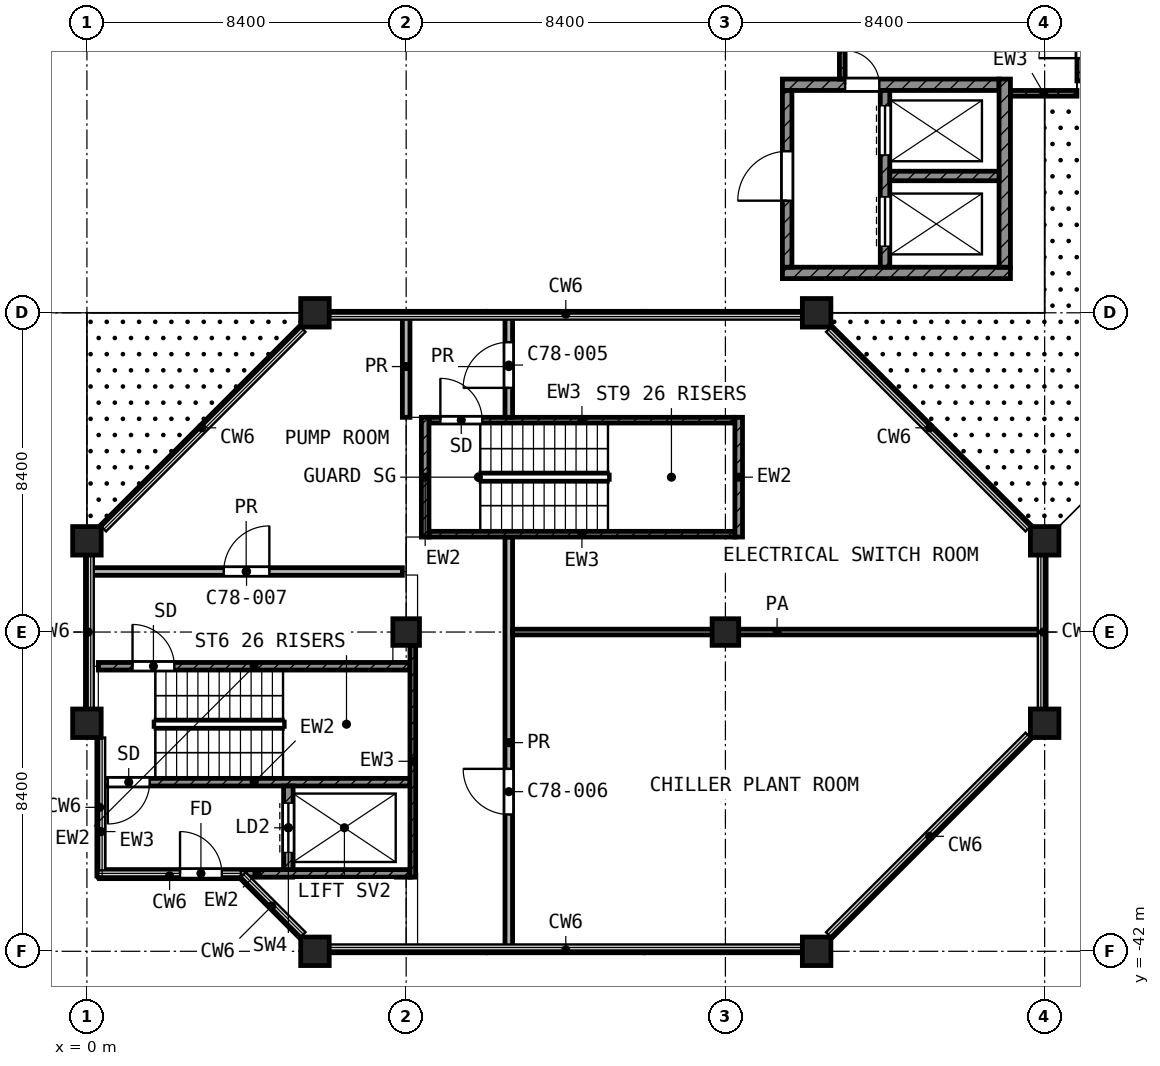
"""IFC4 building model, lengths in metres.
Left out: names, types, materials, properties, quantities, classifications, styles, units other than length and angle.
Written with IfcOpenShell. Run it as: python <this file> out.ifc"""

import sys

from ifc_helpers import new_model, si_unit, direction, frame, frame_2d, origin, origin_2d, place, context, subcontext, project, spatial, rectangle, extrude, element, fill, save


model = new_model("IFC4")
c1 = context("Model", 3, precision=1e-05, world=origin(), true_north=direction((0.0, 1.0)))
c2 = subcontext(c1, "Body", "Model", "MODEL_VIEW")
j1 = project(units=[si_unit("LENGTHUNIT", "METRE"), si_unit("PLANEANGLEUNIT", "RADIAN")], contexts=[c1])
p1 = place(None, origin())
s1 = spatial("IfcSite", under=j1, at=p1, CompositionType="ELEMENT")
p2 = place(p1, origin())
s2 = spatial("IfcBuilding", under=s1, at=p2, CompositionType="ELEMENT")
p3 = place(p2, frame((0.0, 0.0, 336.7)))
s3 = spatial("IfcBuildingStorey", under=s2, at=p3, CompositionType="ELEMENT", Elevation=336.7)
for number, where, z_axis, x_axis in (
    (1, (6.0, -25.2, 0.0), (0.0, 0.0, 1.0), (1.0, 0.0, 0.0)),
    (2, (19.2, -25.2, 0.0), (0.0, 0.0, 1.0), (1.0, 0.0, 0.0)),
    (3, (0.0, -31.2, 0.0), (0.0, 0.0, 1.0), (1.0, 0.0, 0.0)),
    (4, (25.2, -31.2, 0.0), (0.0, 0.0, 1.0), (1.0, 0.0, 0.0)),
):
    element("IfcColumn", number, at=place(p3, frame(where, z_axis=z_axis, x_axis=x_axis)), inside=s3, PredefinedType="COLUMN", context=c2, shape_type="SweptSolid", body=[
        extrude(rectangle(XDim=0.75, YDim=0.75, at=origin_2d()), origin(), (0.0, 0.0, 1.0), 4.5),
    ])
for number, where, z_axis, x_axis in (
    (5, (8.4, -33.6, 0.0), (0.0, 0.0, 1.0), (1.0, 0.0, 0.0)),
    (6, (16.8, -33.6, 0.0), (0.0, 0.0, 1.0), (1.0, 0.0, 0.0)),
):
    element("IfcColumn", number, at=place(p3, frame(where, z_axis=z_axis, x_axis=x_axis)), inside=s3, PredefinedType="COLUMN", context=c2, shape_type="SweptSolid", body=[
        extrude(rectangle(XDim=0.7, YDim=0.7, at=origin_2d()), origin(), (0.0, 0.0, 1.0), 4.5),
    ])
for number, where, z_axis, x_axis in (
    (7, (0.0, -36.0, 0.0), (0.0, 0.0, 1.0), (1.0, 0.0, 0.0)),
    (8, (25.2, -36.0, 0.0), (0.0, 0.0, 1.0), (1.0, 0.0, 0.0)),
    (9, (6.0, -42.0, 0.0), (0.0, 0.0, 1.0), (1.0, 0.0, 0.0)),
    (10, (19.2, -42.0, 0.0), (0.0, 0.0, 1.0), (1.0, 0.0, 0.0)),
):
    element("IfcColumn", number, at=place(p3, frame(where, z_axis=z_axis, x_axis=x_axis)), inside=s3, PredefinedType="COLUMN", context=c2, shape_type="SweptSolid", body=[
        extrude(rectangle(XDim=0.75, YDim=0.75, at=origin_2d()), origin(), (0.0, 0.0, 1.0), 4.5),
    ])
p4 = place(p3, frame((0.375, -40.05, 0.0), z_axis=(0.0, 0.0, 1.0), x_axis=(0.0, 1.0, 0.0)))
e11 = element("IfcWall", 11, at=p4, inside=s3, PredefinedType="SHEAR", context=c2, shape_type="SweptSolid", body=[
    extrude(rectangle(XDim=2.4, YDim=0.15, at=frame_2d((1.2, 0.0))), origin(), (0.0, 0.0, 1.0), 4.2),
])
p5 = place(p3, frame((8.575, -40.05, 0.0), z_axis=(0.0, 0.0, 1.0), x_axis=(0.0, 1.0, 0.0)))
e12 = element("IfcWall", 12, at=p5, inside=s3, PredefinedType="SHEAR", context=c2, shape_type="SweptSolid", body=[
    extrude(rectangle(XDim=6.1, YDim=0.15, at=frame_2d((3.05, 0.0))), origin(), (0.0, 0.0, 1.0), 4.2),
])
p6 = place(p3, frame((0.3, -34.5, 0.0), z_axis=(0.0, 0.0, 1.0), x_axis=(1.0, 0.0, 0.0)))
e13 = element("IfcWall", 13, at=p6, inside=s3, PredefinedType="SHEAR", context=c2, shape_type="SweptSolid", body=[
    extrude(rectangle(XDim=8.2, YDim=0.2, at=frame_2d((4.1, 0.0))), origin(), (0.0, 0.0, 1.0), 4.2),
])
p7 = place(p6, frame((0.9, 0.0, 0.0)))
e14 = element("IfcOpeningElement", 14, at=p7, cuts=e13, PredefinedType="OPENING", context=c2, shape_type="SweptSolid", body=[
    extrude(rectangle(XDim=1.1, YDim=2.1, at=frame_2d((0.55, 1.05))), frame((0.0, 0.11, 0.0), z_axis=(0.0, -1.0, 0.0), x_axis=(1.0, 0.0, 0.0)), (0.0, 0.0, 1.0), 0.22),
])
p8 = place(p3, frame((0.3, -37.55, 0.0), z_axis=(0.0, 0.0, 1.0), x_axis=(1.0, 0.0, 0.0)))
e15 = element("IfcWall", 15, at=p8, inside=s3, PredefinedType="SHEAR", context=c2, shape_type="SweptSolid", body=[
    extrude(rectangle(XDim=8.2, YDim=0.2, at=frame_2d((4.1, 0.0))), origin(), (0.0, 0.0, 1.0), 4.2),
])
p9 = place(p8, frame((0.25, 0.0, 0.0)))
e16 = element("IfcOpeningElement", 16, at=p9, cuts=e15, PredefinedType="OPENING", context=c2, shape_type="SweptSolid", body=[
    extrude(rectangle(XDim=1.1, YDim=2.1, at=frame_2d((0.55, 1.05))), frame((0.0, 0.11, 0.0), z_axis=(0.0, -1.0, 0.0), x_axis=(1.0, 0.0, 0.0)), (0.0, 0.0, 1.0), 0.22),
])
p10 = place(p3, frame((0.45, -39.95, 0.0), z_axis=(0.0, 0.0, 1.0), x_axis=(1.0, 0.0, 0.0)))
e17 = element("IfcWall", 17, at=p10, inside=s3, PredefinedType="SHEAR", context=c2, shape_type="SweptSolid", body=[
    extrude(rectangle(XDim=8.05, YDim=0.2, at=frame_2d((4.025, 0.0))), origin(), (0.0, 0.0, 1.0), 4.2),
])
p11 = place(p10, frame((2.0, 0.0, 0.0)))
e18 = element("IfcOpeningElement", 18, at=p11, cuts=e17, PredefinedType="OPENING", context=c2, shape_type="SweptSolid", body=[
    extrude(rectangle(XDim=1.1, YDim=2.1, at=frame_2d((0.55, 1.05))), frame((0.0, 0.11, 0.0), z_axis=(0.0, -1.0, 0.0), x_axis=(1.0, 0.0, 0.0)), (0.0, 0.0, 1.0), 0.22),
])
p12 = place(p3, frame((5.3, -39.85, 0.0), z_axis=(0.0, 0.0, 1.0), x_axis=(0.0, 1.0, 0.0)))
e19 = element("IfcWall", 19, at=p12, inside=s3, PredefinedType="SHEAR", context=c2, shape_type="SweptSolid", body=[
    extrude(rectangle(XDim=2.2, YDim=0.25, at=frame_2d((1.1, 0.0))), origin(), (0.0, 0.0, 1.0), 4.2),
])
p13 = place(p12, frame((0.45, 0.0, 0.0)))
e20 = element("IfcOpeningElement", 20, at=p13, cuts=e19, PredefinedType="OPENING", context=c2, shape_type="SweptSolid", body=[
    extrude(rectangle(XDim=1.3, YDim=2.1, at=frame_2d((0.65, 1.05))), frame((0.0, 0.135, 0.0), z_axis=(0.0, -1.0, 0.0), x_axis=(1.0, 0.0, 0.0)), (0.0, 0.0, 1.0), 0.27),
])
p14 = place(p3, frame((26.15, -19.1, 0.0), z_axis=(0.0, 0.0, 1.0), x_axis=(0.0, 1.0, 0.0)))
e21 = element("IfcWall", 21, at=p14, inside=s3, PredefinedType="SHEAR", context=c2, shape_type="SweptSolid", body=[
    extrude(rectangle(XDim=3.15, YDim=0.2, at=frame_2d((1.575, 0.0))), origin(), (0.0, 0.0, 1.0), 4.2),
])
p15 = place(p14, frame((0.6, 0.0, 0.0)))
e22 = element("IfcOpeningElement", 22, at=p15, cuts=e21, PredefinedType="OPENING", context=c2, shape_type="SweptSolid", body=[
    extrude(rectangle(XDim=1.1, YDim=2.1, at=frame_2d((0.55, 1.05))), frame((0.0, 0.11, 0.0), z_axis=(0.0, -1.0, 0.0), x_axis=(1.0, 0.0, 0.0)), (0.0, 0.0, 1.0), 0.22),
])
for number, where, z_axis, x_axis in (
    (23, (8.9, -31.1, 0.0), (0.0, 0.0, 1.0), (0.0, 1.0, 0.0)),
    (24, (17.15, -31.1, 0.0), (0.0, 0.0, 1.0), (0.0, 1.0, 0.0)),
):
    element("IfcWall", number, at=place(p3, frame(where, z_axis=z_axis, x_axis=x_axis)), inside=s3, PredefinedType="SHEAR", context=c2, shape_type="SweptSolid", body=[
        extrude(rectangle(XDim=3.15, YDim=0.2, at=frame_2d((1.575, 0.0))), origin(), (0.0, 0.0, 1.0), 4.2),
    ])
p16 = place(p3, frame((9.0, -28.025, 0.0), z_axis=(0.0, 0.0, 1.0), x_axis=(1.0, 0.0, 0.0)))
e25 = element("IfcWall", 25, at=p16, inside=s3, PredefinedType="SHEAR", context=c2, shape_type="SweptSolid", body=[
    extrude(rectangle(XDim=8.05, YDim=0.15, at=frame_2d((4.025, 0.0))), origin(), (0.0, 0.0, 1.0), 4.2),
])
p17 = place(p16, frame((0.3, 0.0, 0.0)))
e26 = element("IfcOpeningElement", 26, at=p17, cuts=e25, PredefinedType="OPENING", context=c2, shape_type="SweptSolid", body=[
    extrude(rectangle(XDim=1.1, YDim=2.1, at=frame_2d((0.55, 1.05))), frame((0.0, 0.085, 0.0), z_axis=(0.0, -1.0, 0.0), x_axis=(1.0, 0.0, 0.0)), (0.0, 0.0, 1.0), 0.17),
])
p18 = place(p3, frame((9.0, -31.025, 0.0), z_axis=(0.0, 0.0, 1.0), x_axis=(1.0, 0.0, 0.0)))
e27 = element("IfcWall", 27, at=p18, inside=s3, PredefinedType="SHEAR", context=c2, shape_type="SweptSolid", body=[
    extrude(rectangle(XDim=8.05, YDim=0.15, at=frame_2d((4.025, 0.0))), origin(), (0.0, 0.0, 1.0), 4.2),
])
p19 = place(p3, frame((18.3, -24.15, 0.0), z_axis=(0.0, 0.0, 1.0), x_axis=(1.0, 0.0, 0.0)))
e28 = element("IfcWall", 28, at=p19, inside=s3, PredefinedType="SHEAR", context=c2, shape_type="SweptSolid", body=[
    extrude(rectangle(XDim=6.0, YDim=0.3, at=frame_2d((3.0, 0.0))), origin(), (0.0, 0.0, 1.0), 4.2),
])
p20 = place(p3, frame((24.15, -24.0, 0.0), z_axis=(0.0, 0.0, 1.0), x_axis=(0.0, 1.0, 0.0)))
e29 = element("IfcWall", 29, at=p20, inside=s3, PredefinedType="SHEAR", context=c2, shape_type="SweptSolid", body=[
    extrude(rectangle(XDim=4.95, YDim=0.3, at=frame_2d((2.475, 0.0))), origin(), (0.0, 0.0, 1.0), 4.2),
])
p21 = place(p3, frame((18.3, -19.2, 0.0), z_axis=(0.0, 0.0, 1.0), x_axis=(1.0, 0.0, 0.0)))
e30 = element("IfcWall", 30, at=p21, inside=s3, PredefinedType="SHEAR", context=c2, shape_type="SweptSolid", body=[
    extrude(rectangle(XDim=5.7, YDim=0.3, at=frame_2d((2.85, 0.0))), origin(), (0.0, 0.0, 1.0), 4.2),
])
p22 = place(p21, frame((1.65, 0.0, 0.0)))
e31 = element("IfcOpeningElement", 31, at=p22, cuts=e30, PredefinedType="OPENING", context=c2, shape_type="SweptSolid", body=[
    extrude(rectangle(XDim=0.9, YDim=2.1, at=frame_2d((0.45, 1.05))), frame((0.0, 0.16, 0.0), z_axis=(0.0, -1.0, 0.0), x_axis=(1.0, 0.0, 0.0)), (0.0, 0.0, 1.0), 0.32),
])
p23 = place(p3, frame((18.425, -24.0, 0.0), z_axis=(0.0, 0.0, 1.0), x_axis=(0.0, 1.0, 0.0)))
e32 = element("IfcWall", 32, at=p23, inside=s3, PredefinedType="SHEAR", context=c2, shape_type="SweptSolid", body=[
    extrude(rectangle(XDim=4.65, YDim=0.25, at=frame_2d((2.325, 0.0))), origin(), (0.0, 0.0, 1.0), 4.2),
])
p24 = place(p23, frame((1.75, 0.0, 0.0)))
e33 = element("IfcOpeningElement", 33, at=p24, cuts=e32, PredefinedType="OPENING", context=c2, shape_type="SweptSolid", body=[
    extrude(rectangle(XDim=1.3, YDim=2.1, at=frame_2d((0.65, 1.05))), frame((0.0, 0.135, 0.0), z_axis=(0.0, -1.0, 0.0), x_axis=(1.0, 0.0, 0.0)), (0.0, 0.0, 1.0), 0.27),
])
p25 = place(p3, frame((21.0, -24.0, 0.0), z_axis=(0.0, 0.0, 1.0), x_axis=(0.0, 1.0, 0.0)))
e34 = element("IfcWall", 34, at=p25, inside=s3, PredefinedType="SHEAR", context=c2, shape_type="SweptSolid", body=[
    extrude(rectangle(XDim=4.65, YDim=0.25, at=frame_2d((2.325, 0.0))), origin(), (0.0, 0.0, 1.0), 4.2),
])
p26 = place(p25, frame((2.95, 0.0, 0.0)))
e35 = element("IfcOpeningElement", 35, at=p26, cuts=e34, PredefinedType="OPENING", context=c2, shape_type="SweptSolid", body=[
    extrude(rectangle(XDim=1.3, YDim=2.1, at=frame_2d((0.65, 1.05))), frame((0.0, 0.135, 0.0), z_axis=(0.0, -1.0, 0.0), x_axis=(1.0, 0.0, 0.0)), (0.0, 0.0, 1.0), 0.27),
])
p27 = place(p25, frame((0.55, 0.0, 0.0)))
e36 = element("IfcOpeningElement", 36, at=p27, cuts=e34, PredefinedType="OPENING", context=c2, shape_type="SweptSolid", body=[
    extrude(rectangle(XDim=1.3, YDim=2.1, at=frame_2d((0.65, 1.05))), frame((0.0, 0.135, 0.0), z_axis=(0.0, -1.0, 0.0), x_axis=(1.0, 0.0, 0.0)), (0.0, 0.0, 1.0), 0.27),
])
p28 = place(p3, frame((21.125, -21.6, 0.0), z_axis=(0.0, 0.0, 1.0), x_axis=(1.0, 0.0, 0.0)))
e37 = element("IfcWall", 37, at=p28, inside=s3, PredefinedType="SHEAR", context=c2, shape_type="SweptSolid", body=[
    extrude(rectangle(XDim=2.875, YDim=0.25, at=frame_2d((1.438, 0.0))), origin(), (0.0, 0.0, 1.0), 4.2),
])
p29 = place(p3, frame((19.875, -19.05, 0.0), z_axis=(0.0, 0.0, 1.0), x_axis=(0.0, 1.0, 0.0)))
e38 = element("IfcWall", 38, at=p29, inside=s3, PredefinedType="SHEAR", context=c2, shape_type="SweptSolid", body=[
    extrude(rectangle(XDim=2.0, YDim=0.15, at=frame_2d((1.0, 0.0))), origin(), (0.0, 0.0, 1.0), 4.2),
])
p30 = place(p3, frame((24.3, -19.425, 0.0), z_axis=(0.0, 0.0, 1.0), x_axis=(1.0, 0.0, 0.0)))
e39 = element("IfcWall", 39, at=p30, inside=s3, PredefinedType="SHEAR", context=c2, shape_type="SweptSolid", body=[
    extrude(rectangle(XDim=1.75, YDim=0.15, at=frame_2d((0.875, 0.0))), origin(), (0.0, 0.0, 1.0), 4.2),
])
p31 = place(p3, frame((11.2, -33.6, 0.0), z_axis=(0.0, 0.0, 1.0), x_axis=(1.0, 0.0, 0.0)))
e40 = element("IfcWall", 40, at=p31, inside=s3, PredefinedType="PARTITIONING", context=c2, shape_type="SweptSolid", body=[
    extrude(rectangle(XDim=13.92, YDim=0.15, at=frame_2d((6.96, 0.0))), origin(), (0.0, 0.0, 1.0), 4.2),
])
p32 = place(p3, frame((0.08, -32.007, 0.0), z_axis=(0.0, 0.0, 1.0), x_axis=(1.0, 0.0, 0.0)))
e41 = element("IfcWall", 41, at=p32, inside=s3, PredefinedType="PARTITIONING", context=c2, shape_type="SweptSolid", body=[
    extrude(rectangle(XDim=8.22, YDim=0.2, at=frame_2d((4.11, 0.0))), origin(), (0.0, 0.0, 1.0), 4.2),
])
p33 = place(p32, frame((3.52, 0.0, 0.0)))
e42 = element("IfcOpeningElement", 42, at=p33, cuts=e41, PredefinedType="OPENING", context=c2, shape_type="SweptSolid", body=[
    extrude(rectangle(XDim=1.2, YDim=2.1, at=frame_2d((0.6, 1.05))), frame((0.0, 0.11, 0.0), z_axis=(0.0, -1.0, 0.0), x_axis=(1.0, 0.0, 0.0)), (0.0, 0.0, 1.0), 0.22),
])
p34 = place(p3, frame((8.4, -27.95, 0.0), z_axis=(0.0, 0.0, 1.0), x_axis=(0.0, 1.0, 0.0)))
e43 = element("IfcWall", 43, at=p34, inside=s3, PredefinedType="PARTITIONING", context=c2, shape_type="SweptSolid", body=[
    extrude(rectangle(XDim=2.67, YDim=0.2, at=frame_2d((1.335, 0.0))), origin(), (0.0, 0.0, 1.0), 4.2),
])
p35 = place(p3, frame((11.1, -41.92, 0.0), z_axis=(0.0, 0.0, 1.0), x_axis=(0.0, 1.0, 0.0)))
e44 = element("IfcWall", 44, at=p35, inside=s3, PredefinedType="PARTITIONING", context=c2, shape_type="SweptSolid", body=[
    extrude(rectangle(XDim=10.82, YDim=0.2, at=frame_2d((5.41, 0.0))), origin(), (0.0, 0.0, 1.0), 4.2),
])
p36 = place(p35, frame((3.52, 0.0, 0.0)))
e45 = element("IfcOpeningElement", 45, at=p36, cuts=e44, PredefinedType="OPENING", context=c2, shape_type="SweptSolid", body=[
    extrude(rectangle(XDim=1.2, YDim=2.1, at=frame_2d((0.6, 1.05))), frame((0.0, 0.11, 0.0), z_axis=(0.0, -1.0, 0.0), x_axis=(1.0, 0.0, 0.0)), (0.0, 0.0, 1.0), 0.22),
])
p37 = place(p3, frame((11.1, -27.95, 0.0), z_axis=(0.0, 0.0, 1.0), x_axis=(0.0, 1.0, 0.0)))
e46 = element("IfcWall", 46, at=p37, inside=s3, PredefinedType="PARTITIONING", context=c2, shape_type="SweptSolid", body=[
    extrude(rectangle(XDim=2.67, YDim=0.2, at=frame_2d((1.335, 0.0))), origin(), (0.0, 0.0, 1.0), 4.2),
])
p38 = place(p37, frame((0.775, 0.0, 0.0)))
e47 = element("IfcOpeningElement", 47, at=p38, cuts=e46, PredefinedType="OPENING", context=c2, shape_type="SweptSolid", body=[
    extrude(rectangle(XDim=1.2, YDim=2.1, at=frame_2d((0.6, 1.05))), frame((0.0, 0.11, 0.0), z_axis=(0.0, -1.0, 0.0), x_axis=(1.0, 0.0, 0.0)), (0.0, 0.0, 1.0), 0.22),
])
p39 = place(p7, origin())
e48 = element("IfcDoor", 48, at=p39, inside=s3, OperationType="SINGLE_SWING_LEFT", PredefinedType="DOOR", context=c2, shape_type="SweptSolid", body=[
    extrude(rectangle(XDim=1.1, YDim=2.1, at=frame_2d((0.55, 1.05))), frame((0.0, 0.025, 0.0), z_axis=(0.0, -1.0, 0.0), x_axis=(1.0, 0.0, 0.0)), (0.0, 0.0, 1.0), 0.05),
])
fill(e14, e48)
p40 = place(p9, frame((1.1, 0.0, 0.0), z_axis=(0.0, 0.0, 1.0), x_axis=(-1.0, 0.0, 0.0)))
e49 = element("IfcDoor", 49, at=p40, inside=s3, OperationType="SINGLE_SWING_LEFT", PredefinedType="DOOR", context=c2, shape_type="SweptSolid", body=[
    extrude(rectangle(XDim=1.1, YDim=2.1, at=frame_2d((0.55, 1.05))), frame((0.0, 0.025, 0.0), z_axis=(0.0, -1.0, 0.0), x_axis=(1.0, 0.0, 0.0)), (0.0, 0.0, 1.0), 0.05),
])
fill(e16, e49)
p41 = place(p13, origin())
e50 = element("IfcDoor", 50, at=p41, inside=s3, OperationType="DOUBLE_DOOR_SLIDING", PredefinedType="DOOR", context=c2, shape_type="SweptSolid", body=[
    extrude(rectangle(XDim=1.3, YDim=2.1, at=frame_2d((0.65, 1.05))), frame((0.0, 0.025, 0.0), z_axis=(0.0, -1.0, 0.0), x_axis=(1.0, 0.0, 0.0)), (0.0, 0.0, 1.0), 0.05),
])
fill(e20, e50)
p42 = place(p11, origin())
e51 = element("IfcDoor", 51, at=p42, inside=s3, OperationType="SINGLE_SWING_LEFT", PredefinedType="DOOR", context=c2, shape_type="SweptSolid", body=[
    extrude(rectangle(XDim=1.1, YDim=2.1, at=frame_2d((0.55, 1.05))), frame((0.0, 0.025, 0.0), z_axis=(0.0, -1.0, 0.0), x_axis=(1.0, 0.0, 0.0)), (0.0, 0.0, 1.0), 0.05),
])
fill(e18, e51)
p43 = place(p17, origin())
e52 = element("IfcDoor", 52, at=p43, inside=s3, OperationType="SINGLE_SWING_LEFT", PredefinedType="DOOR", context=c2, shape_type="SweptSolid", body=[
    extrude(rectangle(XDim=1.1, YDim=2.1, at=frame_2d((0.55, 1.05))), frame((0.0, 0.025, 0.0), z_axis=(0.0, -1.0, 0.0), x_axis=(1.0, 0.0, 0.0)), (0.0, 0.0, 1.0), 0.05),
])
fill(e26, e52)
p44 = place(p22, origin())
e53 = element("IfcDoor", 53, at=p44, inside=s3, OperationType="SINGLE_SWING_LEFT", PredefinedType="DOOR", context=c2, shape_type="SweptSolid", body=[
    extrude(rectangle(XDim=0.9, YDim=2.1, at=frame_2d((0.45, 1.05))), frame((0.0, 0.025, 0.0), z_axis=(0.0, -1.0, 0.0), x_axis=(1.0, 0.0, 0.0)), (0.0, 0.0, 1.0), 0.05),
])
fill(e31, e53)
p45 = place(p24, origin())
e54 = element("IfcDoor", 54, at=p45, inside=s3, OperationType="SINGLE_SWING_LEFT", PredefinedType="DOOR", context=c2, shape_type="SweptSolid", body=[
    extrude(rectangle(XDim=1.3, YDim=2.1, at=frame_2d((0.65, 1.05))), frame((0.0, 0.025, 0.0), z_axis=(0.0, -1.0, 0.0), x_axis=(1.0, 0.0, 0.0)), (0.0, 0.0, 1.0), 0.05),
])
fill(e33, e54)
p46 = place(p26, origin())
e55 = element("IfcDoor", 55, at=p46, inside=s3, OperationType="DOUBLE_DOOR_SLIDING", PredefinedType="DOOR", context=c2, shape_type="SweptSolid", body=[
    extrude(rectangle(XDim=1.3, YDim=2.1, at=frame_2d((0.65, 1.05))), frame((0.0, 0.025, 0.0), z_axis=(0.0, -1.0, 0.0), x_axis=(1.0, 0.0, 0.0)), (0.0, 0.0, 1.0), 0.05),
])
fill(e35, e55)
p47 = place(p27, origin())
e56 = element("IfcDoor", 56, at=p47, inside=s3, OperationType="DOUBLE_DOOR_SLIDING", PredefinedType="DOOR", context=c2, shape_type="SweptSolid", body=[
    extrude(rectangle(XDim=1.3, YDim=2.1, at=frame_2d((0.65, 1.05))), frame((0.0, 0.025, 0.0), z_axis=(0.0, -1.0, 0.0), x_axis=(1.0, 0.0, 0.0)), (0.0, 0.0, 1.0), 0.05),
])
fill(e36, e56)
p48 = place(p38, origin())
e57 = element("IfcDoor", 57, at=p48, inside=s3, OperationType="SINGLE_SWING_LEFT", PredefinedType="DOOR", context=c2, shape_type="SweptSolid", body=[
    extrude(rectangle(XDim=1.2, YDim=2.1, at=frame_2d((0.6, 1.05))), frame((0.0, 0.025, 0.0), z_axis=(0.0, -1.0, 0.0), x_axis=(1.0, 0.0, 0.0)), (0.0, 0.0, 1.0), 0.05),
])
fill(e47, e57)
p49 = place(p36, origin())
e58 = element("IfcDoor", 58, at=p49, inside=s3, OperationType="SINGLE_SWING_RIGHT", PredefinedType="DOOR", context=c2, shape_type="SweptSolid", body=[
    extrude(rectangle(XDim=1.2, YDim=2.1, at=frame_2d((0.6, 1.05))), frame((0.0, 0.025, 0.0), z_axis=(0.0, -1.0, 0.0), x_axis=(1.0, 0.0, 0.0)), (0.0, 0.0, 1.0), 0.05),
])
fill(e45, e58)
p50 = place(p33, origin())
e59 = element("IfcDoor", 59, at=p50, inside=s3, OperationType="SINGLE_SWING_RIGHT", PredefinedType="DOOR", context=c2, shape_type="SweptSolid", body=[
    extrude(rectangle(XDim=1.2, YDim=2.1, at=frame_2d((0.6, 1.05))), frame((0.0, 0.025, 0.0), z_axis=(0.0, -1.0, 0.0), x_axis=(1.0, 0.0, 0.0)), (0.0, 0.0, 1.0), 0.05),
])
fill(e42, e59)
save(model, sys.argv[1])
